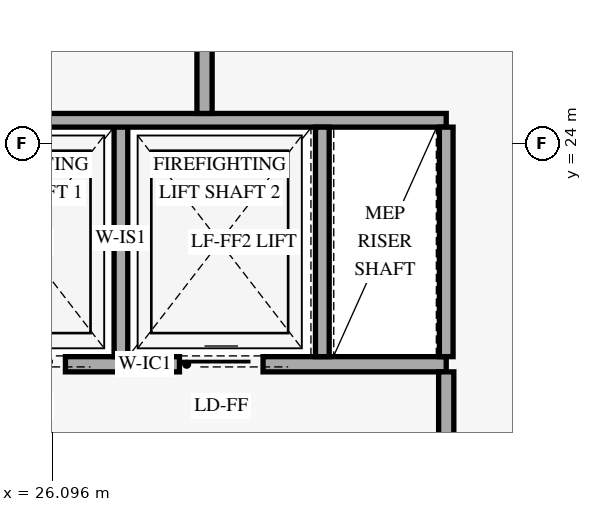
"""IFC4 building model, lengths in metres.
Left out: names, types, materials, properties, quantities, classifications, styles, units other than length and angle.
Written with IfcOpenShell. Run it as: python <this file> out.ifc"""

import sys

from ifc_helpers import new_model, si_unit, direction, frame, frame_2d, origin, place, context, subcontext, project, spatial, rectangle, extrude, element, fill, save


model = new_model("IFC4")
c1 = context("Model", 3, precision=1e-05, world=origin(), true_north=direction((0.0, 1.0)))
c2 = subcontext(c1, "Body", "Model", "MODEL_VIEW")
j1 = project(units=[si_unit("LENGTHUNIT", "METRE"), si_unit("PLANEANGLEUNIT", "RADIAN")], contexts=[c1])
p1 = place(None, origin())
s1 = spatial("IfcSite", under=j1, at=p1, CompositionType="ELEMENT")
p2 = place(p1, origin())
s2 = spatial("IfcBuilding", under=s1, at=p2, CompositionType="ELEMENT")
p3 = place(p2, frame((0.0, 0.0, 24.0)))
s3 = spatial("IfcBuildingStorey", under=s2, at=p3, CompositionType="ELEMENT", Elevation=24.0)
p4 = place(p3, frame((24.45, 21.09, 0.0), z_axis=(0.0, 0.0, 1.0), x_axis=(1.0, 0.0, 0.0)))
e1 = element("IfcWall", 1, at=p4, inside=s3, PredefinedType="STANDARD", context=c2, shape_type="SweptSolid", body=[
    extrude(rectangle(XDim=6.83, YDim=0.2, at=frame_2d((3.415, 0.0))), origin(), (0.0, 0.0, 1.0), 3.36),
])
p5 = place(p4, frame((0.72, 0.0, 0.0)))
e2 = element("IfcOpeningElement", 2, at=p5, cuts=e1, PredefinedType="OPENING", context=c2, shape_type="SweptSolid", body=[
    extrude(rectangle(XDim=1.1, YDim=2.2, at=frame_2d((0.55, 1.1))), frame((0.0, 0.11, 0.0), z_axis=(0.0, -1.0, 0.0), x_axis=(1.0, 0.0, 0.0)), (0.0, 0.0, 1.0), 0.22),
])
p6 = place(p4, frame((3.32, 0.0, 0.0)))
e3 = element("IfcOpeningElement", 3, at=p6, cuts=e1, PredefinedType="OPENING", context=c2, shape_type="SweptSolid", body=[
    extrude(rectangle(XDim=1.1, YDim=2.2, at=frame_2d((0.55, 1.1))), frame((0.0, 0.11, 0.0), z_axis=(0.0, -1.0, 0.0), x_axis=(1.0, 0.0, 0.0)), (0.0, 0.0, 1.0), 0.22),
])
p7 = place(p3, frame((31.28, 17.07, 0.0), z_axis=(0.0, 0.0, 1.0), x_axis=(0.0, 1.0, 0.0)))
e4 = element("IfcWall", 4, at=p7, inside=s3, PredefinedType="STANDARD", context=c2, shape_type="SweptSolid", body=[
    extrude(rectangle(XDim=3.92, YDim=0.2, at=frame_2d((1.96, 0.0))), origin(), (0.0, 0.0, 1.0), 2.649),
])
p8 = place(p7, frame((1.35, 0.0, 0.0)))
e5 = element("IfcOpeningElement", 5, at=p8, cuts=e4, PredefinedType="OPENING", context=c2, shape_type="SweptSolid", body=[
    extrude(rectangle(XDim=1.2, YDim=2.15, at=frame_2d((0.6, 1.075))), frame((0.0, 0.11, 0.0), z_axis=(0.0, -1.0, 0.0), x_axis=(1.0, 0.0, 0.0)), (0.0, 0.0, 1.0), 0.22),
])
p9 = place(p3, frame((27.0, 21.19, 0.0), z_axis=(0.0, 0.0, 1.0), x_axis=(0.0, 1.0, 0.0)))
e6 = element("IfcWall", 6, at=p9, inside=s3, PredefinedType="STANDARD", context=c2, shape_type="SweptSolid", body=[
    extrude(rectangle(XDim=3.11, YDim=0.18, at=frame_2d((1.555, 0.0))), origin(), (0.0, 0.0, 1.0), 3.36),
])
p10 = place(p3, frame((24.45, 24.3, 0.0), z_axis=(0.0, 0.0, 1.0), x_axis=(1.0, 0.0, 0.0)))
e7 = element("IfcWall", 7, at=p10, inside=s3, PredefinedType="STANDARD", context=c2, shape_type="SweptSolid", body=[
    extrude(rectangle(XDim=6.83, YDim=0.18, at=frame_2d((3.415, 0.0))), origin(), (0.0, 0.0, 1.0), 3.36),
])
for number, where, z_axis, x_axis in (
    (8, (29.65, 21.19, 0.0), (0.0, 0.0, 1.0), (0.0, 1.0, 0.0)),
    (9, (31.28, 21.19, 0.0), (0.0, 0.0, 1.0), (0.0, 1.0, 0.0)),
):
    element("IfcWall", number, at=place(p3, frame(where, z_axis=z_axis, x_axis=x_axis)), inside=s3, PredefinedType="STANDARD", context=c2, shape_type="SweptSolid", body=[
        extrude(rectangle(XDim=3.02, YDim=0.18, at=frame_2d((1.51, 0.0))), origin(), (0.0, 0.0, 1.0), 3.36),
    ])
p11 = place(p3, frame((28.1, 24.39, 0.0), z_axis=(0.0, 0.0, 1.0), x_axis=(0.0, 1.0, 0.0)))
e10 = element("IfcWall", 10, at=p11, inside=s3, PredefinedType="STANDARD", context=c2, shape_type="SweptSolid", body=[
    extrude(rectangle(XDim=4.75, YDim=0.2, at=frame_2d((2.375, 0.0))), origin(), (0.0, 0.0, 1.0), 3.36),
])
p12 = place(p11, frame((1.86, 0.0, 0.0)))
e11 = element("IfcOpeningElement", 11, at=p12, cuts=e10, PredefinedType="OPENING", context=c2, shape_type="SweptSolid", body=[
    extrude(rectangle(XDim=0.9, YDim=2.1, at=frame_2d((0.45, 1.05))), frame((0.0, 0.11, 0.0), z_axis=(0.0, -1.0, 0.0), x_axis=(1.0, 0.0, 0.0)), (0.0, 0.0, 1.0), 0.22),
])
p13 = place(p5, origin())
e12 = element("IfcDoor", 12, at=p13, inside=s3, OperationType="SLIDING_TO_LEFT", PredefinedType="DOOR", context=c2, shape_type="SweptSolid", body=[
    extrude(rectangle(XDim=1.1, YDim=2.2, at=frame_2d((0.55, 1.1))), frame((0.0, 0.025, 0.0), z_axis=(0.0, -1.0, 0.0), x_axis=(1.0, 0.0, 0.0)), (0.0, 0.0, 1.0), 0.05),
])
fill(e2, e12)
p14 = place(p6, origin())
e13 = element("IfcDoor", 13, at=p14, inside=s3, OperationType="SLIDING_TO_LEFT", PredefinedType="DOOR", context=c2, shape_type="SweptSolid", body=[
    extrude(rectangle(XDim=1.1, YDim=2.2, at=frame_2d((0.55, 1.1))), frame((0.0, 0.025, 0.0), z_axis=(0.0, -1.0, 0.0), x_axis=(1.0, 0.0, 0.0)), (0.0, 0.0, 1.0), 0.05),
])
fill(e3, e13)
save(model, sys.argv[1])
